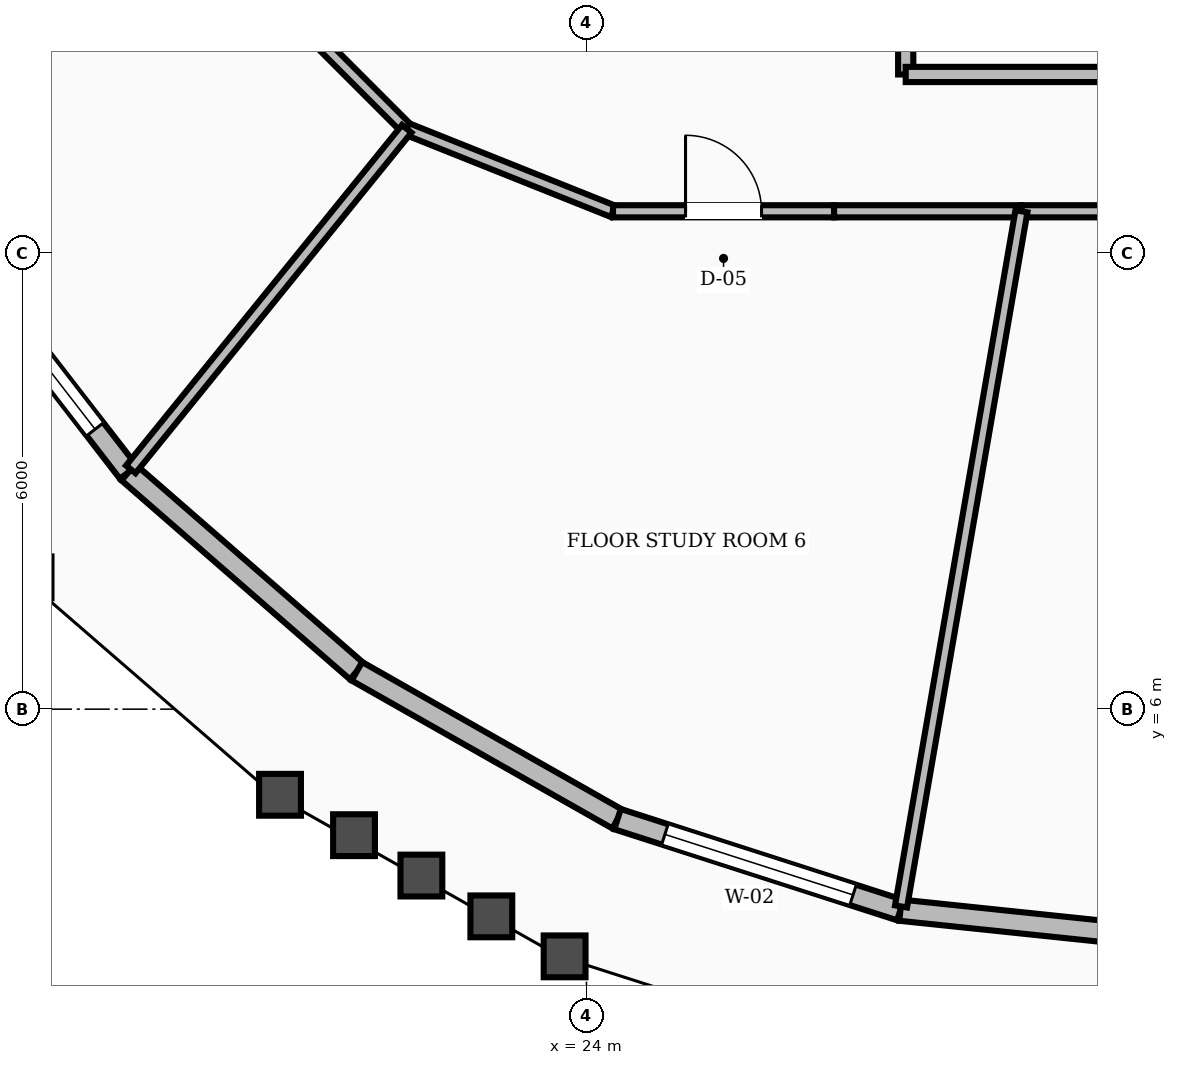
"""IFC4 building model, lengths in metres.
Left out: names, types, materials, properties, quantities, classifications, styles, units other than length and angle.
Written with IfcOpenShell. Run it as: python <this file> out.ifc"""

import sys

from ifc_helpers import new_model, si_unit, direction, frame, frame_2d, origin, place, context, subcontext, project, spatial, rectangle, extrude, element, fill, save


model = new_model("IFC4")
c1 = context("Model", 3, precision=1e-05, world=origin(), true_north=direction((0.0, 1.0)))
c2 = subcontext(c1, "Body", "Model", "MODEL_VIEW")
j1 = project(units=[si_unit("LENGTHUNIT", "METRE"), si_unit("PLANEANGLEUNIT", "RADIAN")], contexts=[c1])
p1 = place(None, origin())
s1 = spatial("IfcSite", under=j1, at=p1, CompositionType="ELEMENT")
p2 = place(p1, origin())
s2 = spatial("IfcBuilding", under=s1, at=p2, CompositionType="ELEMENT")
p3 = place(p2, frame((0.0, 0.0, 265.2)))
s3 = spatial("IfcBuildingStorey", under=s2, at=p3, CompositionType="ELEMENT", Elevation=265.2)
p4 = place(p3, frame((15.507, 12.306, 0.0), z_axis=(0.0, 0.0, 1.0), x_axis=(0.611762796107, -0.791041263968, 0.0)))
e1 = element("IfcWall", 1, at=p4, inside=s3, PredefinedType="STANDARD", context=c2, shape_type="SweptSolid", body=[
    extrude(rectangle(XDim=4.032, YDim=0.28, at=frame_2d((2.016, 0.0))), origin(), (0.0, 0.0, 1.0), 2.88),
])
p5 = place(p4, frame((0.716, 0.0, 0.8)))
e2 = element("IfcOpeningElement", 2, at=p5, cuts=e1, PredefinedType="OPENING", context=c2, shape_type="SweptSolid", body=[
    extrude(rectangle(XDim=2.6, YDim=1.65, at=frame_2d((1.3, 0.825))), frame((0.0, 0.15, 0.0), z_axis=(0.0, -1.0, 0.0), x_axis=(1.0, 0.0, 0.0)), (0.0, 0.0, 1.0), 0.3),
])
p6 = place(p3, frame((17.973, 9.116, 0.0), z_axis=(0.0, 0.0, 1.0), x_axis=(0.75414910989, -0.656703220681, 0.0)))
e3 = element("IfcWall", 3, at=p6, inside=s3, PredefinedType="STANDARD", context=c2, shape_type="SweptSolid", body=[
    extrude(rectangle(XDim=3.986, YDim=0.28, at=frame_2d((1.993, 0.0))), origin(), (0.0, 0.0, 1.0), 2.88),
])
p7 = place(p3, frame((20.979, 6.498, 0.0), z_axis=(0.0, 0.0, 1.0), x_axis=(0.869835312163, -0.49334220346, 0.0)))
e4 = element("IfcWall", 4, at=p7, inside=s3, PredefinedType="STANDARD", context=c2, shape_type="SweptSolid", body=[
    extrude(rectangle(XDim=3.943, YDim=0.28, at=frame_2d((1.971, 0.0))), origin(), (0.0, 0.0, 1.0), 2.88),
])
p8 = place(p3, frame((24.409, 4.553, 0.0), z_axis=(0.0, 0.0, 1.0), x_axis=(0.951905022268, -0.306393258053, 0.0)))
e5 = element("IfcWall", 5, at=p8, inside=s3, PredefinedType="STANDARD", context=c2, shape_type="SweptSolid", body=[
    extrude(rectangle(XDim=3.909, YDim=0.28, at=frame_2d((1.955, 0.0))), origin(), (0.0, 0.0, 1.0), 2.88),
])
p9 = place(p8, frame((0.655, 0.0, 0.8)))
e6 = element("IfcOpeningElement", 6, at=p9, cuts=e5, PredefinedType="OPENING", context=c2, shape_type="SweptSolid", body=[
    extrude(rectangle(XDim=2.6, YDim=1.65, at=frame_2d((1.3, 0.825))), frame((0.0, 0.15, 0.0), z_axis=(0.0, -1.0, 0.0), x_axis=(1.0, 0.0, 0.0)), (0.0, 0.0, 1.0), 0.3),
])
p10 = place(p3, frame((28.13, 3.355, 0.0), z_axis=(0.0, 0.0, 1.0), x_axis=(0.9945804904, -0.103969457611, 0.0)))
e7 = element("IfcWall", 7, at=p10, inside=s3, PredefinedType="STANDARD", context=c2, shape_type="SweptSolid", body=[
    extrude(rectangle(XDim=3.891, YDim=0.28, at=frame_2d((1.945, 0.0))), origin(), (0.0, 0.0, 1.0), 2.88),
])
p11 = place(p3, frame((28.2, 14.35, 0.0), z_axis=(0.0, 0.0, 1.0), x_axis=(0.0, 1.0, 0.0)))
e8 = element("IfcWall", 8, at=p11, inside=s3, PredefinedType="SOLIDWALL", context=c2, shape_type="SweptSolid", body=[
    extrude(rectangle(XDim=2.2, YDim=0.2, at=frame_2d((1.1, 0.0))), origin(), (0.0, 0.0, 1.0), 2.87),
])
p12 = place(p3, frame((28.2, 14.35, 0.0), z_axis=(0.0, 0.0, 1.0), x_axis=(1.0, 0.0, 0.0)))
e9 = element("IfcWall", 9, at=p12, inside=s3, PredefinedType="SOLIDWALL", context=c2, shape_type="SweptSolid", body=[
    extrude(rectangle(XDim=7.6, YDim=0.2, at=frame_2d((3.8, 0.0))), origin(), (0.0, 0.0, 1.0), 2.87),
])
p13 = place(p12, frame((3.2, 0.0, 0.0)))
e10 = element("IfcOpeningElement", 10, at=p13, cuts=e9, PredefinedType="OPENING", context=c2, shape_type="SweptSolid", body=[
    extrude(rectangle(XDim=1.2, YDim=2.1, at=frame_2d((0.6, 1.05))), frame((0.0, 0.11, 0.0), z_axis=(0.0, -1.0, 0.0), x_axis=(1.0, 0.0, 0.0)), (0.0, 0.0, 1.0), 0.22),
])
p14 = place(p3, frame((19.573, 15.697, 0.0), z_axis=(0.0, 0.0, 1.0), x_axis=(0.707106781187, -0.707106781187, 0.0)))
e11 = element("IfcWall", 11, at=p14, inside=s3, PredefinedType="SOLIDWALL", context=c2, shape_type="SweptSolid", body=[
    extrude(rectangle(XDim=2.916, YDim=0.16, at=frame_2d((1.458, 0.0))), origin(), (0.0, 0.0, 1.0), 2.87),
])
p15 = place(p3, frame((21.635, 13.635, 0.0), z_axis=(0.0, 0.0, 1.0), x_axis=(0.92856882165, -0.371160266542, 0.0)))
e12 = element("IfcWall", 12, at=p15, inside=s3, PredefinedType="SOLIDWALL", context=c2, shape_type="SweptSolid", body=[
    extrude(rectangle(XDim=2.923, YDim=0.16, at=frame_2d((1.461, 0.0))), origin(), (0.0, 0.0, 1.0), 2.87),
])
p16 = place(p3, frame((24.349, 12.55, 0.0), z_axis=(0.0, 0.0, 1.0), x_axis=(1.0, 0.0, 0.0)))
e13 = element("IfcWall", 13, at=p16, inside=s3, PredefinedType="SOLIDWALL", context=c2, shape_type="SweptSolid", body=[
    extrude(rectangle(XDim=2.908, YDim=0.16, at=frame_2d((1.454, 0.0))), origin(), (0.0, 0.0, 1.0), 2.87),
])
p17 = place(p16, frame((0.954, 0.0, 0.0)))
e14 = element("IfcOpeningElement", 14, at=p17, cuts=e13, PredefinedType="OPENING", context=c2, shape_type="SweptSolid", body=[
    extrude(rectangle(XDim=1.0, YDim=2.1, at=frame_2d((0.5, 1.05))), frame((0.0, 0.09, 0.0), z_axis=(0.0, -1.0, 0.0), x_axis=(1.0, 0.0, 0.0)), (0.0, 0.0, 1.0), 0.18),
])
p18 = place(p3, frame((27.257, 12.55, 0.0), z_axis=(0.0, 0.0, 1.0), x_axis=(1.0, 0.0, 0.0)))
e15 = element("IfcWall", 15, at=p18, inside=s3, PredefinedType="SOLIDWALL", context=c2, shape_type="SweptSolid", body=[
    extrude(rectangle(XDim=2.465, YDim=0.16, at=frame_2d((1.232, 0.0))), origin(), (0.0, 0.0, 1.0), 2.87),
])
p19 = place(p3, frame((29.722, 12.55, 0.0), z_axis=(0.0, 0.0, 1.0), x_axis=(1.0, 0.0, 0.0)))
e16 = element("IfcWall", 16, at=p19, inside=s3, PredefinedType="SOLIDWALL", context=c2, shape_type="SweptSolid", body=[
    extrude(rectangle(XDim=2.278, YDim=0.16, at=frame_2d((1.139, 0.0))), origin(), (0.0, 0.0, 1.0), 2.87),
])
p20 = place(p3, frame((21.635, 13.635, 0.0), z_axis=(0.0, 0.0, 1.0), x_axis=(-0.629541636782, -0.776966748039, 0.0)))
e17 = element("IfcWall", 17, at=p20, inside=s3, PredefinedType="SOLIDWALL", context=c2, shape_type="SweptSolid", body=[
    extrude(rectangle(XDim=5.766, YDim=0.16, at=frame_2d((2.883, 0.0))), origin(), (0.0, 0.0, 1.0), 2.87),
])
p21 = place(p3, frame((29.722, 12.55, 0.0), z_axis=(0.0, 0.0, 1.0), x_axis=(-0.170636222974, -0.985334095325, 0.0)))
e18 = element("IfcWall", 18, at=p21, inside=s3, PredefinedType="SOLIDWALL", context=c2, shape_type="SweptSolid", body=[
    extrude(rectangle(XDim=9.281, YDim=0.16, at=frame_2d((4.641, 0.0))), origin(), (0.0, 0.0, 1.0), 2.87),
])
p22 = place(p5, origin())
e19 = element("IfcWindow", 19, at=p22, inside=s3, PartitioningType="SINGLE_PANEL", PredefinedType="WINDOW", context=c2, shape_type="SweptSolid", body=[
    extrude(rectangle(XDim=2.6, YDim=1.65, at=frame_2d((1.3, 0.825))), frame((0.0, 0.03, 0.0), z_axis=(0.0, -1.0, 0.0), x_axis=(1.0, 0.0, 0.0)), (0.0, 0.0, 1.0), 0.06),
])
fill(e2, e19)
p23 = place(p9, origin())
e20 = element("IfcWindow", 20, at=p23, inside=s3, PartitioningType="SINGLE_PANEL", PredefinedType="WINDOW", context=c2, shape_type="SweptSolid", body=[
    extrude(rectangle(XDim=2.6, YDim=1.65, at=frame_2d((1.3, 0.825))), frame((0.0, 0.03, 0.0), z_axis=(0.0, -1.0, 0.0), x_axis=(1.0, 0.0, 0.0)), (0.0, 0.0, 1.0), 0.06),
])
fill(e6, e20)
p24 = place(p17, origin())
e21 = element("IfcDoor", 21, at=p24, inside=s3, OperationType="SINGLE_SWING_LEFT", PredefinedType="DOOR", context=c2, shape_type="SweptSolid", body=[
    extrude(rectangle(XDim=1.0, YDim=2.1, at=frame_2d((0.5, 1.05))), frame((0.0, 0.025, 0.0), z_axis=(0.0, -1.0, 0.0), x_axis=(1.0, 0.0, 0.0)), (0.0, 0.0, 1.0), 0.05),
])
fill(e14, e21)
save(model, sys.argv[1])
